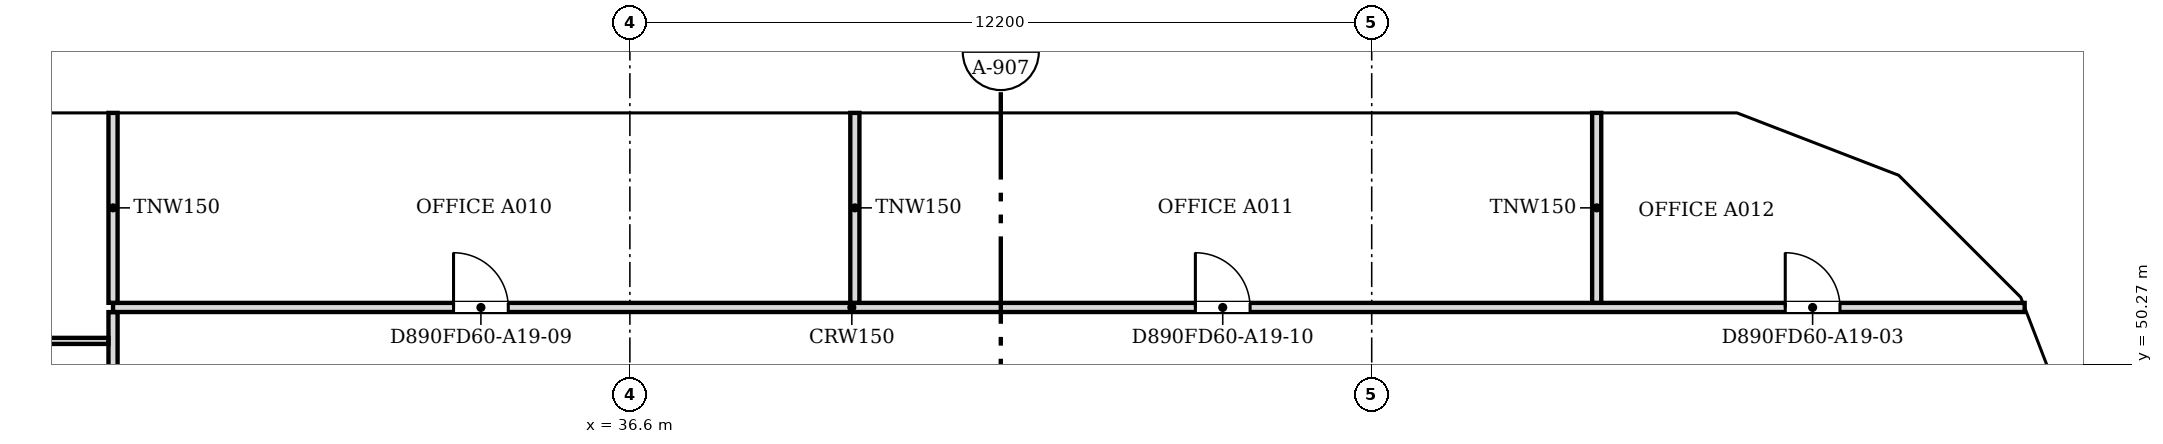
"""IFC4 building model, lengths in metres.
Left out: names, types, materials, properties, quantities, classifications, styles, units other than length and angle.
Written with IfcOpenShell. Run it as: python <this file> out.ifc"""

import sys

from ifc_helpers import new_model, si_unit, direction, frame, frame_2d, origin, place, context, subcontext, project, spatial, polyline, rectangle, outline, extrude, faceted_brep, source, transform, mapped, element, fill, save


model = new_model("IFC4")
c1 = context("Model", 3, precision=1e-05, world=origin(), true_north=direction((0.0, 1.0)))
c2 = subcontext(c1, "Body", "Model", "MODEL_VIEW")
j1 = project(units=[si_unit("LENGTHUNIT", "METRE"), si_unit("PLANEANGLEUNIT", "RADIAN")], contexts=[c1])
p1 = place(None, origin())
s1 = spatial("IfcSite", under=j1, at=p1, CompositionType="ELEMENT")
p2 = place(p1, origin())
s2 = spatial("IfcBuilding", under=s1, at=p2, CompositionType="ELEMENT")
p3 = place(p2, frame((0.0, 0.0, 209.3)))
s3 = spatial("IfcBuildingStorey", under=s2, at=p3, CompositionType="ELEMENT", Elevation=209.3)
m1 = source(origin(), c2, "Body", "Brep", [
    faceted_brep([(0.047, -0.25, 0.0), (2.997, -0.25, 3.8), (0.047, -0.25, 7.6), (0.0, -0.25, 7.541), (0.0, -0.25, 0.059), (0.093, 0.25, 7.54), (2.944, 0.25, 3.868), (2.944, 0.25, 3.732), (0.093, 0.25, 0.06), (2.997, 0.0, 3.8), (0.047, 0.0, 0.0), (0.047, 0.0, 7.6)], [[[0, 1, 2, 3, 4]], [[5, 6, 7, 8]], [[8, 7, 9, 1, 0, 10]], [[6, 5, 11, 2, 1, 9]], [[3, 2, 11]], [[10, 0, 4]], [[8, 10, 4, 3, 11, 5]], [[9, 7, 6]]]),
])
p4 = place(p3, frame((60.767, 48.71, -3.8), z_axis=(0.0, 0.0, 1.0), x_axis=(-0.359901446078, 0.932990326376, 0.0)))
e1 = element("IfcWall", 1, at=p4, inside=s3, PredefinedType="SOLIDWALL", context=c2, shape_type="MappedRepresentation", body=[
    mapped(m1, transform((0.0, 0.0, 0.0), scale=1.0)),
])
m2 = source(origin(), c2, "Body", "SweptSolid", [
    extrude(outline(polyline([(0.247, 0.665), (2.681, 3.8), (0.247, 6.935), (0.247, 0.665)])), frame((0.0, 0.26, 0.0), z_axis=(0.0, -1.0, 0.0), x_axis=(1.0, 0.0, 0.0)), (0.0, 0.0, 1.0), 0.52),
])
p5 = place(p4, origin())
e2 = element("IfcOpeningElement", 2, at=p5, cuts=e1, PredefinedType="OPENING", context=c2, shape_type="MappedRepresentation", body=[
    mapped(m2, transform((0.0, 0.0, 0.0), scale=1.0)),
])
m3 = source(origin(), c2, "Body", "Brep", [
    faceted_brep([(2.944, -0.25, 0.0), (2.997, -0.25, 0.068), (2.997, -0.25, 7.532), (2.944, -0.25, 7.6), (0.0, -0.25, 3.8), (0.053, 0.25, 3.868), (2.891, 0.25, 7.532), (2.891, 0.25, 0.068), (0.053, 0.25, 3.732), (2.944, 0.0, 0.0), (2.944, 0.0, 7.6), (0.0, 0.0, 3.8)], [[[0, 1, 2, 3, 4]], [[5, 6, 7, 8]], [[1, 0, 9]], [[10, 3, 2]], [[6, 5, 11, 4, 3, 10]], [[8, 7, 9, 0, 4, 11]], [[8, 11, 5]], [[1, 9, 7, 6, 10, 2]]]),
])
p6 = place(p3, frame((59.688, 51.506, -3.8), z_axis=(0.0, 0.0, 1.0), x_axis=(-0.707106781187, 0.707106781187, 0.0)))
e3 = element("IfcWall", 3, at=p6, inside=s3, PredefinedType="SOLIDWALL", context=c2, shape_type="MappedRepresentation", body=[
    mapped(m3, transform((0.0, 0.0, 0.0), scale=1.0)),
])
m4 = source(origin(), c2, "Body", "SweptSolid", [
    extrude(outline(polyline([(2.744, 6.934), (0.316, 3.8), (2.744, 0.666), (2.744, 6.934)])), frame((0.0, 0.26, 0.0), z_axis=(0.0, -1.0, 0.0), x_axis=(1.0, 0.0, 0.0)), (0.0, 0.0, 1.0), 0.52),
])
p7 = place(p6, origin())
e4 = element("IfcOpeningElement", 4, at=p7, cuts=e3, PredefinedType="OPENING", context=c2, shape_type="MappedRepresentation", body=[
    mapped(m4, transform((0.0, 0.0, 0.0), scale=1.0)),
])
m5 = source(origin(), c2, "Body", "Brep", [
    faceted_brep([(0.053, -0.25, 0.0), (3.003, -0.25, 3.8), (0.053, -0.25, 7.6), (0.0, -0.25, 7.532), (0.0, -0.25, 0.068), (0.106, 0.25, 7.532), (2.957, 0.25, 3.86), (2.957, 0.25, 3.74), (0.106, 0.25, 0.068), (3.003, 0.0, 3.8), (0.053, 0.0, 0.0), (0.053, 0.0, 7.6)], [[[0, 1, 2, 3, 4]], [[5, 6, 7, 8]], [[8, 7, 9, 1, 0, 10]], [[6, 5, 11, 2, 1, 9]], [[3, 2, 11]], [[10, 0, 4]], [[8, 10, 4, 3, 11, 5]], [[9, 7, 6]]]),
])
p8 = place(p3, frame((57.656, 53.569, -3.8), z_axis=(0.0, 0.0, 1.0), x_axis=(-0.933007896601, 0.359855894603, 0.0)))
e5 = element("IfcWall", 5, at=p8, inside=s3, PredefinedType="SOLIDWALL", context=c2, shape_type="MappedRepresentation", body=[
    mapped(m5, transform((0.0, 0.0, 0.0), scale=1.0)),
])
m6 = source(origin(), c2, "Body", "SweptSolid", [
    extrude(outline(polyline([(0.253, 0.665), (2.687, 3.8), (0.253, 6.935), (0.253, 0.665)])), frame((0.0, 0.26, 0.0), z_axis=(0.0, -1.0, 0.0), x_axis=(1.0, 0.0, 0.0)), (0.0, 0.0, 1.0), 0.52),
])
p9 = place(p8, origin())
e6 = element("IfcOpeningElement", 6, at=p9, cuts=e5, PredefinedType="OPENING", context=c2, shape_type="MappedRepresentation", body=[
    mapped(m6, transform((0.0, 0.0, 0.0), scale=1.0)),
])
m7 = source(origin(), c2, "Body", "Brep", [
    faceted_brep([(3.003, -0.25, 0.0), (6.053, -0.25, 3.8), (3.003, -0.25, 7.6), (0.0, -0.25, 3.8), (0.047, 0.25, 3.859), (3.003, 0.25, 7.6), (6.053, 0.25, 3.8), (3.003, 0.25, 0.0), (0.047, 0.25, 3.741), (0.0, 0.0, 3.8)], [[[0, 1, 2, 3]], [[4, 5, 6, 7, 8]], [[7, 6, 1, 0]], [[6, 5, 2, 1]], [[5, 4, 9, 3, 2]], [[8, 7, 0, 3, 9]], [[8, 9, 4]]]),
])
p10 = place(p3, frame((54.854, 54.65, -3.8), z_axis=(0.0, 0.0, 1.0), x_axis=(-1.0, 0.0, 0.0)))
e7 = element("IfcWall", 7, at=p10, inside=s3, PredefinedType="SOLIDWALL", context=c2, shape_type="MappedRepresentation", body=[
    mapped(m7, transform((0.0, 0.0, 0.0), scale=1.0)),
])
m8 = source(origin(), c2, "Body", "SweptSolid", [
    extrude(outline(polyline([(3.005, 0.401), (5.733, 3.8), (3.005, 7.199), (0.319, 3.8), (3.005, 0.401)])), frame((0.0, 0.26, 0.0), z_axis=(0.0, -1.0, 0.0), x_axis=(1.0, 0.0, 0.0)), (0.0, 0.0, 1.0), 0.52),
])
p11 = place(p10, origin())
e8 = element("IfcOpeningElement", 8, at=p11, cuts=e7, PredefinedType="OPENING", context=c2, shape_type="MappedRepresentation", body=[
    mapped(m8, transform((0.0, 0.0, 0.0), scale=1.0)),
])
m9 = source(origin(), c2, "Body", "SweptSolid", [
    extrude(outline(polyline([(3.05, 0.0), (6.1, 3.8), (3.05, 7.6), (0.0, 3.8), (3.05, 0.0)])), frame((0.0, 0.25, 0.0), z_axis=(0.0, -1.0, 0.0), x_axis=(1.0, 0.0, 0.0)), (0.0, 0.0, 1.0), 0.5),
])
p12 = place(p3, frame((48.8, 54.65, -3.8), z_axis=(0.0, 0.0, 1.0), x_axis=(-1.0, 0.0, 0.0)))
e9 = element("IfcWall", 9, at=p12, inside=s3, PredefinedType="SOLIDWALL", context=c2, shape_type="MappedRepresentation", body=[
    mapped(m9, transform((0.0, 0.0, 0.0), scale=1.0)),
])
m10 = source(origin(), c2, "Body", "SweptSolid", [
    extrude(outline(polyline([(3.05, 0.399), (5.78, 3.8), (3.05, 7.201), (0.321, 3.8), (3.05, 0.399)])), frame((0.0, 0.26, 0.0), z_axis=(0.0, -1.0, 0.0), x_axis=(1.0, 0.0, 0.0)), (0.0, 0.0, 1.0), 0.52),
])
p13 = place(p12, origin())
e10 = element("IfcOpeningElement", 10, at=p13, cuts=e9, PredefinedType="OPENING", context=c2, shape_type="MappedRepresentation", body=[
    mapped(m10, transform((0.0, 0.0, 0.0), scale=1.0)),
])
m11 = source(origin(), c2, "Body", "Brep", [
    faceted_brep([(3.05, -0.25, 0.0), (6.1, -0.25, 3.8), (6.1, -0.25, 3.8), (3.05, -0.25, 7.6), (0.0, -0.25, 3.8), (0.0, 0.25, 3.8), (3.05, 0.25, 7.6), (6.1, 0.25, 3.8), (6.1, 0.25, 3.8), (3.05, 0.25, 0.0)], [[[0, 1, 2, 3, 4]], [[5, 6, 7, 8, 9]], [[9, 8, 1, 0]], [[7, 6, 3, 2]], [[6, 5, 4, 3]], [[5, 9, 0, 4]], [[1, 8, 7, 2]]]),
])
p14 = place(p3, frame((42.7, 54.65, -3.8), z_axis=(0.0, 0.0, 1.0), x_axis=(-1.0, 0.0, 0.0)))
e11 = element("IfcWall", 11, at=p14, inside=s3, PredefinedType="SOLIDWALL", context=c2, shape_type="MappedRepresentation", body=[
    mapped(m11, transform((0.0, 0.0, 0.0), scale=1.0)),
])
p15 = place(p14, origin())
e12 = element("IfcOpeningElement", 12, at=p15, cuts=e11, PredefinedType="OPENING", context=c2, shape_type="MappedRepresentation", body=[
    mapped(m10, transform((0.0, 0.0, 0.0), scale=1.0)),
])
p16 = place(p3, frame((36.6, 54.65, -3.8), z_axis=(0.0, 0.0, 1.0), x_axis=(-1.0, 0.0, 0.0)))
e13 = element("IfcWall", 13, at=p16, inside=s3, PredefinedType="SOLIDWALL", context=c2, shape_type="MappedRepresentation", body=[
    mapped(m9, transform((0.0, 0.0, 0.0), scale=1.0)),
])
p17 = place(p16, origin())
e14 = element("IfcOpeningElement", 14, at=p17, cuts=e13, PredefinedType="OPENING", context=c2, shape_type="MappedRepresentation", body=[
    mapped(m10, transform((0.0, 0.0, 0.0), scale=1.0)),
])
p18 = place(p3, frame((30.5, 54.65, -3.8), z_axis=(0.0, 0.0, 1.0), x_axis=(-1.0, 0.0, 0.0)))
e15 = element("IfcWall", 15, at=p18, inside=s3, PredefinedType="SOLIDWALL", context=c2, shape_type="MappedRepresentation", body=[
    mapped(m9, transform((0.0, 0.0, 0.0), scale=1.0)),
])
p19 = place(p18, origin())
e16 = element("IfcOpeningElement", 16, at=p19, cuts=e15, PredefinedType="OPENING", context=c2, shape_type="MappedRepresentation", body=[
    mapped(m10, transform((0.0, 0.0, 0.0), scale=1.0)),
])
p20 = place(p2, frame((0.0, 0.0, 213.1)))
s4 = spatial("IfcBuildingStorey", under=s2, at=p20, CompositionType="ELEMENT", Elevation=213.1)
m12 = source(origin(), c2, "Body", "Brep", [
    faceted_brep([(2.95, -0.25, 0.0), (3.003, -0.25, 0.068), (3.003, -0.25, 7.531), (2.95, -0.25, 7.6), (0.0, -0.25, 3.8), (0.047, 0.25, 3.86), (2.898, 0.25, 7.532), (2.898, 0.25, 0.068), (0.047, 0.25, 3.74), (2.95, 0.0, 0.0), (2.95, 0.0, 7.6), (0.0, 0.0, 3.8)], [[[0, 1, 2, 3, 4]], [[5, 6, 7, 8]], [[1, 0, 9]], [[10, 3, 2]], [[6, 5, 11, 4, 3, 10]], [[8, 7, 9, 0, 4, 11]], [[8, 11, 5]], [[1, 9, 7, 6, 10, 2]]]),
])
p21 = place(p20, frame((60.75, 48.753, -3.8), z_axis=(0.0, 0.0, 1.0), x_axis=(-0.35992665181, 0.932980602862, 0.0)))
e17 = element("IfcWall", 17, at=p21, inside=s4, PredefinedType="SOLIDWALL", context=c2, shape_type="MappedRepresentation", body=[
    mapped(m12, transform((0.0, 0.0, 0.0), scale=1.0)),
])
m13 = source(origin(), c2, "Body", "SweptSolid", [
    extrude(outline(polyline([(2.75, 6.935), (0.316, 3.8), (2.75, 0.665), (2.75, 6.935)])), frame((0.0, 0.26, 0.0), z_axis=(0.0, -1.0, 0.0), x_axis=(1.0, 0.0, 0.0)), (0.0, 0.0, 1.0), 0.52),
])
p22 = place(p21, origin())
e18 = element("IfcOpeningElement", 18, at=p22, cuts=e17, PredefinedType="OPENING", context=c2, shape_type="MappedRepresentation", body=[
    mapped(m13, transform((0.0, 0.0, 0.0), scale=1.0)),
])
m14 = source(origin(), c2, "Body", "Brep", [
    faceted_brep([(0.053, -0.25, 0.0), (2.997, -0.25, 3.8), (0.053, -0.25, 7.6), (0.0, -0.25, 7.532), (0.0, -0.25, 0.068), (0.106, 0.25, 7.531), (2.944, 0.25, 3.868), (2.944, 0.25, 3.732), (0.106, 0.25, 0.068), (2.997, 0.0, 3.8), (0.053, 0.0, 0.0), (0.053, 0.0, 7.6)], [[[0, 1, 2, 3, 4]], [[5, 6, 7, 8]], [[8, 7, 9, 1, 0, 10]], [[6, 5, 11, 2, 1, 9]], [[3, 2, 11]], [[10, 0, 4]], [[8, 10, 4, 3, 11, 5]], [[7, 6, 9]]]),
])
p23 = place(p20, frame((59.726, 51.469, -3.8), z_axis=(0.0, 0.0, 1.0), x_axis=(-0.707106781187, 0.707106781187, 0.0)))
e19 = element("IfcWall", 19, at=p23, inside=s4, PredefinedType="SOLIDWALL", context=c2, shape_type="MappedRepresentation", body=[
    mapped(m14, transform((0.0, 0.0, 0.0), scale=1.0)),
])
m15 = source(origin(), c2, "Body", "SweptSolid", [
    extrude(outline(polyline([(0.253, 0.666), (2.681, 3.8), (0.253, 6.934), (0.253, 0.666)])), frame((0.0, 0.26, 0.0), z_axis=(0.0, -1.0, 0.0), x_axis=(1.0, 0.0, 0.0)), (0.0, 0.0, 1.0), 0.52),
])
p24 = place(p23, origin())
e20 = element("IfcOpeningElement", 20, at=p24, cuts=e19, PredefinedType="OPENING", context=c2, shape_type="MappedRepresentation", body=[
    mapped(m15, transform((0.0, 0.0, 0.0), scale=1.0)),
])
m16 = source(origin(), c2, "Body", "Brep", [
    faceted_brep([(2.95, -0.25, 0.0), (2.997, -0.25, 0.059), (2.997, -0.25, 7.541), (2.95, -0.25, 7.6), (0.0, -0.25, 3.8), (0.053, 0.25, 3.868), (2.904, 0.25, 7.54), (2.904, 0.25, 0.06), (0.053, 0.25, 3.732), (2.95, 0.0, 0.0), (2.95, 0.0, 7.6), (0.0, 0.0, 3.8)], [[[0, 1, 2, 3, 4]], [[5, 6, 7, 8]], [[1, 0, 9]], [[10, 3, 2]], [[6, 5, 11, 4, 3, 10]], [[8, 7, 9, 0, 4, 11]], [[8, 11, 5]], [[1, 9, 7, 6, 10, 2]]]),
])
p25 = place(p20, frame((57.606, 53.588, -3.8), z_axis=(0.0, 0.0, 1.0), x_axis=(-0.932990326376, 0.359901446078, 0.0)))
e21 = element("IfcWall", 21, at=p25, inside=s4, PredefinedType="SOLIDWALL", context=c2, shape_type="MappedRepresentation", body=[
    mapped(m16, transform((0.0, 0.0, 0.0), scale=1.0)),
])
p26 = place(p25, origin())
e22 = element("IfcOpeningElement", 22, at=p26, cuts=e21, PredefinedType="OPENING", context=c2, shape_type="MappedRepresentation", body=[
    mapped(m13, transform((0.0, 0.0, 0.0), scale=1.0)),
])
m17 = source(origin(), c2, "Body", "Brep", [
    faceted_brep([(0.047, -0.25, 0.0), (3.05, -0.25, 3.8), (0.047, -0.25, 7.6), (0.0, -0.25, 7.54), (0.0, -0.25, 0.06), (0.093, 0.25, 7.541), (3.05, 0.25, 3.8), (0.093, 0.25, 0.059), (0.047, 0.0, 0.0), (0.047, 0.0, 7.6)], [[[0, 1, 2, 3, 4]], [[5, 6, 7]], [[7, 6, 1, 0, 8]], [[6, 5, 9, 2, 1]], [[3, 2, 9]], [[8, 0, 4]], [[7, 8, 4, 3, 9, 5]]]),
])
p27 = place(p20, frame((54.9, 54.65, -3.8), z_axis=(0.0, 0.0, 1.0), x_axis=(-1.0, 0.0, 0.0)))
e23 = element("IfcWall", 23, at=p27, inside=s4, PredefinedType="SOLIDWALL", context=c2, shape_type="MappedRepresentation", body=[
    mapped(m17, transform((0.0, 0.0, 0.0), scale=1.0)),
])
m18 = source(origin(), c2, "Body", "SweptSolid", [
    extrude(outline(polyline([(0.247, 0.656), (2.731, 3.8), (0.247, 6.944), (0.247, 0.656)])), frame((0.0, 0.26, 0.0), z_axis=(0.0, -1.0, 0.0), x_axis=(1.0, 0.0, 0.0)), (0.0, 0.0, 1.0), 0.52),
])
p28 = place(p27, origin())
e24 = element("IfcOpeningElement", 24, at=p28, cuts=e23, PredefinedType="OPENING", context=c2, shape_type="MappedRepresentation", body=[
    mapped(m18, transform((0.0, 0.0, 0.0), scale=1.0)),
])
m19 = source(origin(), c2, "Body", "SweptSolid", [
    extrude(outline(polyline([(3.05, 0.0), (6.1, 3.8), (3.05, 7.6), (0.0, 3.8), (3.05, 0.0)])), frame((0.0, 0.25, 0.0), z_axis=(0.0, -1.0, 0.0), x_axis=(1.0, 0.0, 0.0)), (0.0, 0.0, 1.0), 0.5),
])
p29 = place(p20, frame((51.85, 54.65, -3.8), z_axis=(0.0, 0.0, 1.0), x_axis=(-1.0, 0.0, 0.0)))
e25 = element("IfcWall", 25, at=p29, inside=s4, PredefinedType="SOLIDWALL", context=c2, shape_type="MappedRepresentation", body=[
    mapped(m19, transform((0.0, 0.0, 0.0), scale=1.0)),
])
m20 = source(origin(), c2, "Body", "SweptSolid", [
    extrude(outline(polyline([(3.05, 0.399), (5.78, 3.8), (3.05, 7.2), (0.321, 3.8), (3.05, 0.399)])), frame((0.0, 0.26, 0.0), z_axis=(0.0, -1.0, 0.0), x_axis=(1.0, 0.0, 0.0)), (0.0, 0.0, 1.0), 0.52),
])
p30 = place(p29, origin())
e26 = element("IfcOpeningElement", 26, at=p30, cuts=e25, PredefinedType="OPENING", context=c2, shape_type="MappedRepresentation", body=[
    mapped(m20, transform((0.0, 0.0, 0.0), scale=1.0)),
])
p31 = place(p20, frame((45.75, 54.65, -3.8), z_axis=(0.0, 0.0, 1.0), x_axis=(-1.0, 0.0, 0.0)))
e27 = element("IfcWall", 27, at=p31, inside=s4, PredefinedType="SOLIDWALL", context=c2, shape_type="MappedRepresentation", body=[
    mapped(m19, transform((0.0, 0.0, 0.0), scale=1.0)),
])
p32 = place(p31, origin())
e28 = element("IfcOpeningElement", 28, at=p32, cuts=e27, PredefinedType="OPENING", context=c2, shape_type="MappedRepresentation", body=[
    mapped(m20, transform((0.0, 0.0, 0.0), scale=1.0)),
])
m21 = source(origin(), c2, "Body", "Brep", [
    faceted_brep([(3.05, -0.25, 0.0), (6.1, -0.25, 3.8), (6.1, -0.25, 3.8), (3.05, -0.25, 7.6), (0.0, -0.25, 3.8), (0.0, 0.25, 3.8), (3.05, 0.25, 7.6), (6.1, 0.25, 3.8), (6.1, 0.25, 3.8), (3.05, 0.25, 0.0)], [[[0, 1, 2, 3, 4]], [[5, 6, 7, 8, 9]], [[9, 8, 1, 0]], [[7, 6, 3, 2]], [[6, 5, 4, 3]], [[5, 9, 0, 4]], [[1, 8, 7, 2]]]),
])
p33 = place(p20, frame((39.65, 54.65, -3.8), z_axis=(0.0, 0.0, 1.0), x_axis=(-1.0, 0.0, 0.0)))
e29 = element("IfcWall", 29, at=p33, inside=s4, PredefinedType="SOLIDWALL", context=c2, shape_type="MappedRepresentation", body=[
    mapped(m21, transform((0.0, 0.0, 0.0), scale=1.0)),
])
p34 = place(p33, origin())
e30 = element("IfcOpeningElement", 30, at=p34, cuts=e29, PredefinedType="OPENING", context=c2, shape_type="MappedRepresentation", body=[
    mapped(m20, transform((0.0, 0.0, 0.0), scale=1.0)),
])
p35 = place(p20, frame((33.55, 54.65, -3.8), z_axis=(0.0, 0.0, 1.0), x_axis=(-1.0, 0.0, 0.0)))
e31 = element("IfcWall", 31, at=p35, inside=s4, PredefinedType="SOLIDWALL", context=c2, shape_type="MappedRepresentation", body=[
    mapped(m19, transform((0.0, 0.0, 0.0), scale=1.0)),
])
p36 = place(p35, origin())
e32 = element("IfcOpeningElement", 32, at=p36, cuts=e31, PredefinedType="OPENING", context=c2, shape_type="MappedRepresentation", body=[
    mapped(m20, transform((0.0, 0.0, 0.0), scale=1.0)),
])
p37 = place(p20, frame((27.45, 54.65, -3.8), z_axis=(0.0, 0.0, 1.0), x_axis=(-1.0, 0.0, 0.0)))
e33 = element("IfcWall", 33, at=p37, inside=s4, PredefinedType="SOLIDWALL", context=c2, shape_type="MappedRepresentation", body=[
    mapped(m21, transform((0.0, 0.0, 0.0), scale=1.0)),
])
p38 = place(p37, origin())
e34 = element("IfcOpeningElement", 34, at=p38, cuts=e33, PredefinedType="OPENING", context=c2, shape_type="MappedRepresentation", body=[
    mapped(m20, transform((0.0, 0.0, 0.0), scale=1.0)),
])
p39 = place(p3, frame((28.1, 47.376, 0.0), z_axis=(0.0, 0.0, 1.0), x_axis=(0.0, 1.0, 0.0)))
e35 = element("IfcWall", 35, at=p39, inside=s3, PredefinedType="PARTITIONING", context=c2, shape_type="SweptSolid", body=[
    extrude(rectangle(XDim=3.748, YDim=0.15, at=frame_2d((1.874, 0.0))), origin(), (0.0, 0.0, 1.0), 3.067),
])
p40 = place(p3, frame((19.776, 50.65, 0.0), z_axis=(0.0, 0.0, 1.0), x_axis=(1.0, 0.0, 0.0)))
e36 = element("IfcWall", 36, at=p40, inside=s3, PredefinedType="PARTITIONING", context=c2, shape_type="SweptSolid", body=[
    extrude(rectangle(XDim=8.248, YDim=0.1, at=frame_2d((4.124, 0.0))), origin(), (0.0, 0.0, 1.0), 3.067),
])
m22 = source(origin(), c2, "Body", "SweptSolid", [
    extrude(rectangle(XDim=0.9, YDim=2.1, at=frame_2d((0.45, 1.05))), frame((0.0, 0.06, 0.0), z_axis=(0.0, -1.0, 0.0), x_axis=(1.0, 0.0, 0.0)), (0.0, 0.0, 1.0), 0.12),
])
p41 = place(p40, frame((3.7, 0.0, 0.0)))
e37 = element("IfcOpeningElement", 37, at=p41, cuts=e36, PredefinedType="OPENING", context=c2, shape_type="MappedRepresentation", body=[
    mapped(m22, transform((0.0, 0.0, 0.0), scale=1.0)),
])
p42 = place(p3, frame((28.1, 51.2, 0.0), z_axis=(0.0, 0.0, 1.0), x_axis=(1.0, 0.0, 0.0)))
e38 = element("IfcWall", 38, at=p42, inside=s3, PredefinedType="PARTITIONING", context=c2, shape_type="SweptSolid", body=[
    extrude(rectangle(XDim=31.438, YDim=0.15, at=frame_2d((15.719, 0.0))), origin(), (0.0, 0.0, 1.0), 3.067),
])
m23 = source(origin(), c2, "Body", "SweptSolid", [
    extrude(rectangle(XDim=0.9, YDim=2.1, at=frame_2d((0.45, 1.05))), frame((0.0, 0.085, 0.0), z_axis=(0.0, -1.0, 0.0), x_axis=(1.0, 0.0, 0.0)), (0.0, 0.0, 1.0), 0.17),
])
p43 = place(p42, frame((27.501, 0.0, 0.0)))
e39 = element("IfcOpeningElement", 39, at=p43, cuts=e38, PredefinedType="OPENING", context=c2, shape_type="MappedRepresentation", body=[
    mapped(m23, transform((0.0, 0.0, 0.0), scale=1.0)),
])
p44 = place(p42, frame((5.6, 0.0, 0.0)))
e40 = element("IfcOpeningElement", 40, at=p44, cuts=e38, PredefinedType="OPENING", context=c2, shape_type="MappedRepresentation", body=[
    mapped(m23, transform((0.0, 0.0, 0.0), scale=1.0)),
])
p45 = place(p42, frame((17.8, 0.0, 0.0)))
e41 = element("IfcOpeningElement", 41, at=p45, cuts=e38, PredefinedType="OPENING", context=c2, shape_type="MappedRepresentation", body=[
    mapped(m23, transform((0.0, 0.0, 0.0), scale=1.0)),
])
for number, where, z_axis, x_axis in (
    (42, (28.1, 51.276, 0.0), (0.0, 0.0, 1.0), (0.0, 1.0, 0.0)),
    (43, (40.3, 51.276, 0.0), (0.0, 0.0, 1.0), (0.0, 1.0, 0.0)),
    (44, (52.5, 51.276, 0.0), (0.0, 0.0, 1.0), (0.0, 1.0, 0.0)),
):
    element("IfcWall", number, at=place(p3, frame(where, z_axis=z_axis, x_axis=x_axis)), inside=s3, PredefinedType="PARTITIONING", context=c2, shape_type="SweptSolid", body=[
        extrude(rectangle(XDim=3.124, YDim=0.15, at=frame_2d((1.562, 0.0))), origin(), (0.0, 0.0, 1.0), 3.067),
    ])
m24 = source(origin(), c2, "Body", "SweptSolid", [
    extrude(rectangle(XDim=0.9, YDim=2.1, at=frame_2d((0.45, 1.05))), frame((0.0, 0.025, 0.0), z_axis=(0.0, -1.0, 0.0), x_axis=(1.0, 0.0, 0.0)), (0.0, 0.0, 1.0), 0.05),
])
p46 = place(p43, origin())
e45 = element("IfcDoor", 45, at=p46, inside=s3, OperationType="SINGLE_SWING_LEFT", PredefinedType="DOOR", context=c2, shape_type="MappedRepresentation", body=[
    mapped(m24, transform((0.0, 0.0, 0.0), scale=1.0)),
])
fill(e39, e45)
p47 = place(p44, origin())
e46 = element("IfcDoor", 46, at=p47, inside=s3, OperationType="SINGLE_SWING_LEFT", PredefinedType="DOOR", context=c2, shape_type="MappedRepresentation", body=[
    mapped(m24, transform((0.0, 0.0, 0.0), scale=1.0)),
])
fill(e40, e46)
p48 = place(p45, origin())
e47 = element("IfcDoor", 47, at=p48, inside=s3, OperationType="SINGLE_SWING_LEFT", PredefinedType="DOOR", context=c2, shape_type="MappedRepresentation", body=[
    mapped(m24, transform((0.0, 0.0, 0.0), scale=1.0)),
])
fill(e41, e47)
save(model, sys.argv[1])
